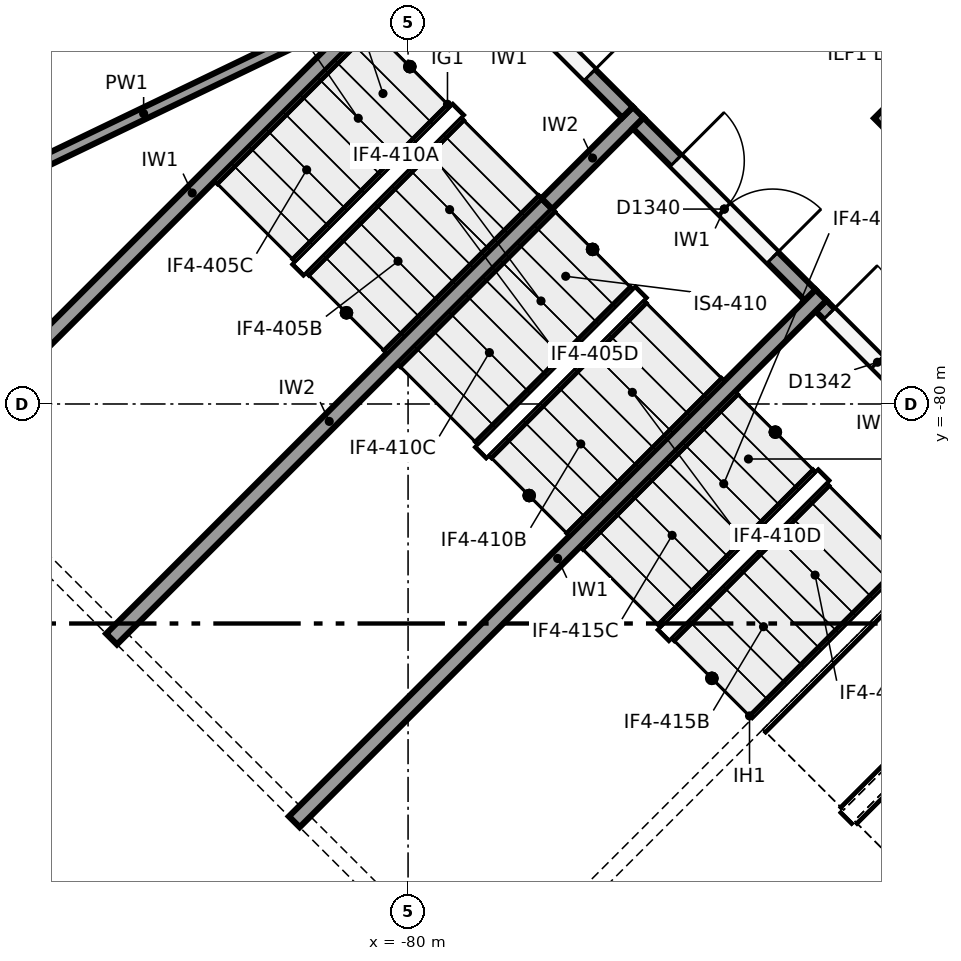
"""IFC4 building model, lengths in metres.
Left out: names, types, materials, properties, quantities, classifications, styles, units other than length and angle.
Written with IfcOpenShell. Run it as: python <this file> out.ifc"""

import sys

from ifc_helpers import new_model, si_unit, direction, frame, frame_2d, origin, place, context, subcontext, project, spatial, rectangle, extrude, element, fill, save


model = new_model("IFC4")
c1 = context("Model", 3, precision=1e-05, world=origin(), true_north=direction((0.0, 1.0)))
c2 = subcontext(c1, "Body", "Model", "MODEL_VIEW")
j1 = project(units=[si_unit("LENGTHUNIT", "METRE"), si_unit("PLANEANGLEUNIT", "RADIAN")], contexts=[c1])
p1 = place(None, origin())
s1 = spatial("IfcSite", under=j1, at=p1, CompositionType="ELEMENT")
p2 = place(p1, origin())
s2 = spatial("IfcBuilding", under=s1, at=p2, CompositionType="ELEMENT")
p3 = place(p2, frame((0.0, 0.0, 18.0)))
s3 = spatial("IfcBuildingStorey", under=s2, at=p3, CompositionType="ELEMENT", Elevation=18.0)
for number, where, z_axis, x_axis in (
    (1, (-86.305, -80.688, 0.0), (0.0, 0.0, 1.0), (0.707, 0.707, 0.0)),
    (2, (-81.497, -85.497, 0.0), (0.0, 0.0, 1.0), (0.707, 0.707, 0.0)),
    (3, (-76.688, -90.305, 0.0), (0.0, 0.0, 1.0), (0.707, 0.707, 0.0)),
):
    element("IfcWall", number, at=place(p3, frame(where, z_axis=z_axis, x_axis=x_axis)), inside=s3, PredefinedType="SHEAR", context=c2, shape_type="SweptSolid", body=[
        extrude(rectangle(XDim=9.8, YDim=0.2, at=frame_2d((4.9, 0.0))), origin(), (0.0, 0.0, 1.0), 5.6),
    ])
for number, where, z_axis, x_axis in (
    (4, (-86.164, -80.688, 0.0), (0.0, 0.0, 1.0), (0.707, -0.707, 0.0)),
    (5, (-81.355, -85.497, 0.0), (0.0, 0.0, 1.0), (0.707, -0.707, 0.0)),
):
    element("IfcWall", number, at=place(p3, frame(where, z_axis=z_axis, x_axis=x_axis)), inside=s3, PredefinedType="SHEAR", context=c2, shape_type="SweptSolid", body=[
        extrude(rectangle(XDim=6.6, YDim=0.2, at=frame_2d((3.3, 0.0))), origin(), (0.0, 0.0, 1.0), 5.6),
    ])
p4 = place(p3, frame((-83.901, -83.093, 0.0), z_axis=(0.0, 0.0, 1.0), x_axis=(0.707106781187, 0.707106781187, 0.0)))
e6 = element("IfcWall", 6, at=p4, inside=s3, PredefinedType="SHEAR", context=c2, shape_type="SweptSolid", body=[
    extrude(rectangle(XDim=8.1, YDim=0.2, at=frame_2d((4.05, 0.0))), origin(), (0.0, 0.0, 1.0), 5.6),
])
p5 = place(p3, frame((-78.173, -77.365, 0.0), z_axis=(0.0, 0.0, 1.0), x_axis=(0.707178586901, 0.707034968179, 0.0)))
e7 = element("IfcWall", 7, at=p5, inside=s3, PredefinedType="SHEAR", context=c2, shape_type="SweptSolid", body=[
    extrude(rectangle(XDim=1.7, YDim=0.2, at=frame_2d((0.85, 0.0))), origin(), (0.0, 0.0, 1.0), 5.6),
])
p6 = place(p3, frame((-79.093, -87.901, 0.0), z_axis=(0.0, 0.0, 1.0), x_axis=(0.707106781187, 0.707106781187, 0.0)))
e8 = element("IfcWall", 8, at=p6, inside=s3, PredefinedType="SHEAR", context=c2, shape_type="SweptSolid", body=[
    extrude(rectangle(XDim=8.1, YDim=0.2, at=frame_2d((4.05, 0.0))), origin(), (0.0, 0.0, 1.0), 5.6),
])
p7 = place(p3, frame((-79.375, -73.9, 0.0), z_axis=(0.0, 0.0, 1.0), x_axis=(0.707068634461, -0.707144925854, 0.0)))
e9 = element("IfcWall", 9, at=p7, inside=s3, PredefinedType="SHEAR", context=c2, shape_type="SweptSolid", body=[
    extrude(rectangle(XDim=3.2, YDim=0.2, at=frame_2d((1.6, 0.0))), origin(), (0.0, 0.0, 1.0), 5.6),
])
p8 = place(p7, frame((0.7, 0.0, 0.0)))
e10 = element("IfcOpeningElement", 10, at=p8, cuts=e9, PredefinedType="OPENING", context=c2, shape_type="SweptSolid", body=[
    extrude(rectangle(XDim=1.8, YDim=2.1, at=frame_2d((0.9, 1.05))), frame((0.0, 0.11, 0.0), z_axis=(0.0, -1.0, 0.0), x_axis=(1.0, 0.0, 0.0)), (0.0, 0.0, 1.0), 0.22),
])
p9 = place(p3, frame((-76.971, -76.304, 0.0), z_axis=(0.0, 0.0, 1.0), x_axis=(0.707106781187, -0.707106781187, 0.0)))
e11 = element("IfcWall", 11, at=p9, inside=s3, PredefinedType="SHEAR", context=c2, shape_type="SweptSolid", body=[
    extrude(rectangle(XDim=3.2, YDim=0.2, at=frame_2d((1.6, 0.0))), origin(), (0.0, 0.0, 1.0), 5.6),
])
p10 = place(p9, frame((0.7, 0.0, 0.0)))
e12 = element("IfcOpeningElement", 12, at=p10, cuts=e11, PredefinedType="OPENING", context=c2, shape_type="SweptSolid", body=[
    extrude(rectangle(XDim=1.8, YDim=2.1, at=frame_2d((0.9, 1.05))), frame((0.0, 0.11, 0.0), z_axis=(0.0, -1.0, 0.0), x_axis=(1.0, 0.0, 0.0)), (0.0, 0.0, 1.0), 0.22),
])
p11 = place(p3, frame((-74.567, -78.708, 0.0), z_axis=(0.0, 0.0, 1.0), x_axis=(0.707106781187, -0.707106781187, 0.0)))
e13 = element("IfcWall", 13, at=p11, inside=s3, PredefinedType="SHEAR", context=c2, shape_type="SweptSolid", body=[
    extrude(rectangle(XDim=3.2, YDim=0.2, at=frame_2d((1.6, 0.0))), origin(), (0.0, 0.0, 1.0), 5.6),
])
p12 = place(p11, frame((0.15, 0.0, 0.0)))
e14 = element("IfcOpeningElement", 14, at=p12, cuts=e13, PredefinedType="OPENING", context=c2, shape_type="SweptSolid", body=[
    extrude(rectangle(XDim=1.8, YDim=2.1, at=frame_2d((0.9, 1.05))), frame((0.0, 0.11, 0.0), z_axis=(0.0, -1.0, 0.0), x_axis=(1.0, 0.0, 0.0)), (0.0, 0.0, 1.0), 0.22),
])
p13 = place(p3, frame((-73.797, -76.312, 0.0), z_axis=(0.0, 0.0, 1.0), x_axis=(0.707106781187, 0.707106781187, 0.0)))
e15 = element("IfcWall", 15, at=p13, inside=s3, PredefinedType="SHEAR", context=c2, shape_type="SweptSolid", body=[
    extrude(rectangle(XDim=3.0, YDim=0.2, at=frame_2d((1.5, 0.0))), origin(), (0.0, 0.0, 1.0), 4.6),
])
p14 = place(p3, frame((-80.782, -74.883, 0.0), z_axis=(0.0, 0.0, 1.0), x_axis=(-0.901191146896, -0.433421869264, 0.0)))
e16 = element("IfcWall", 16, at=p14, inside=s3, PredefinedType="PARTITIONING", context=c2, shape_type="SweptSolid", body=[
    extrude(rectangle(XDim=5.985, YDim=0.15, at=frame_2d((2.992, 0.0))), origin(), (0.0, 0.0, 1.0), 5.6),
])
p15 = place(p8, origin())
e17 = element("IfcDoor", 17, at=p15, inside=s3, OperationType="DOUBLE_DOOR_SINGLE_SWING", PredefinedType="DOOR", context=c2, shape_type="SweptSolid", body=[
    extrude(rectangle(XDim=1.8, YDim=2.1, at=frame_2d((0.9, 1.05))), frame((0.0, 0.025, 0.0), z_axis=(0.0, -1.0, 0.0), x_axis=(1.0, 0.0, 0.0)), (0.0, 0.0, 1.0), 0.05),
])
fill(e10, e17)
p16 = place(p10, origin())
e18 = element("IfcDoor", 18, at=p16, inside=s3, OperationType="DOUBLE_DOOR_SINGLE_SWING", PredefinedType="DOOR", context=c2, shape_type="SweptSolid", body=[
    extrude(rectangle(XDim=1.8, YDim=2.1, at=frame_2d((0.9, 1.05))), frame((0.0, 0.025, 0.0), z_axis=(0.0, -1.0, 0.0), x_axis=(1.0, 0.0, 0.0)), (0.0, 0.0, 1.0), 0.05),
])
fill(e12, e18)
p17 = place(p12, origin())
e19 = element("IfcDoor", 19, at=p17, inside=s3, OperationType="DOUBLE_DOOR_SINGLE_SWING", PredefinedType="DOOR", context=c2, shape_type="SweptSolid", body=[
    extrude(rectangle(XDim=1.8, YDim=2.1, at=frame_2d((0.9, 1.05))), frame((0.0, 0.025, 0.0), z_axis=(0.0, -1.0, 0.0), x_axis=(1.0, 0.0, 0.0)), (0.0, 0.0, 1.0), 0.05),
])
fill(e14, e19)
save(model, sys.argv[1])
